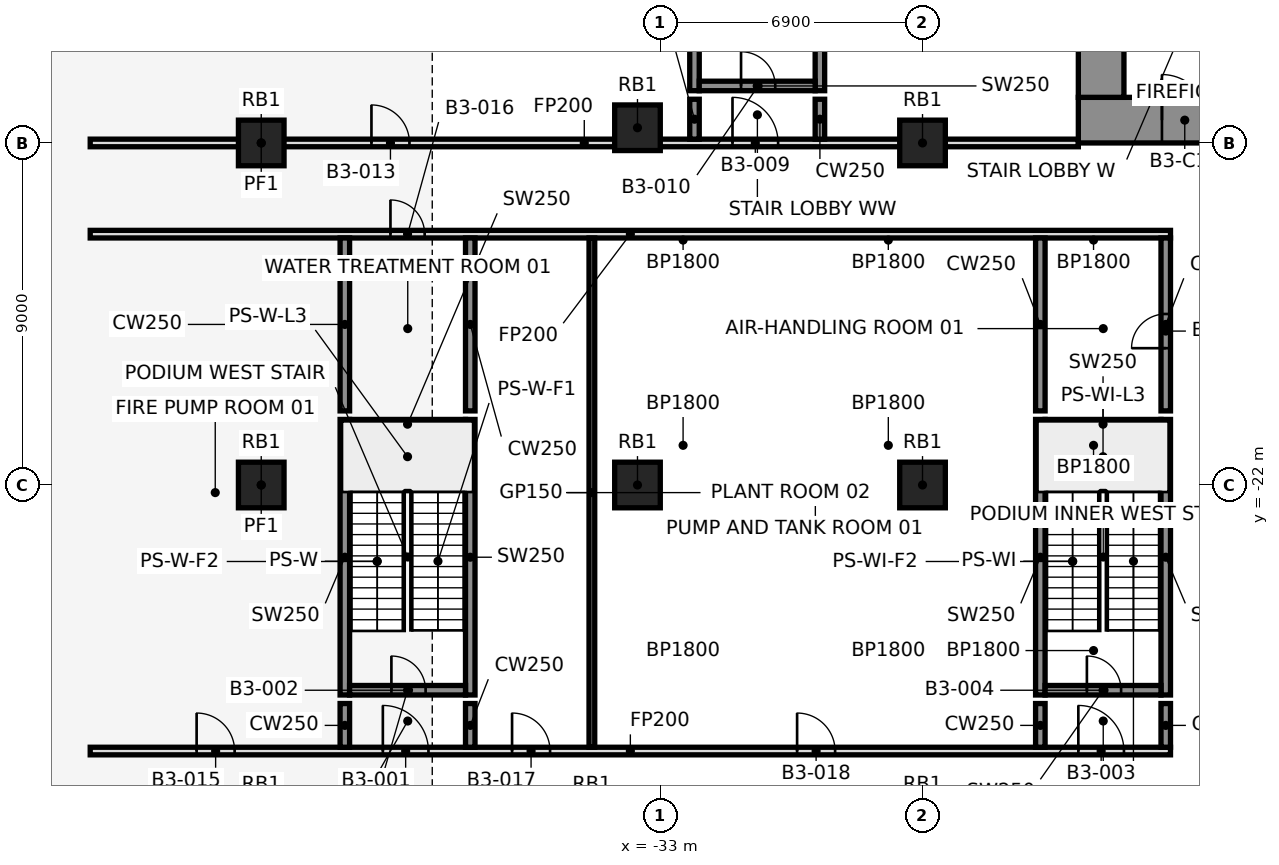
"""IFC4 building model, lengths in metres.
Left out: names, types, materials, properties, quantities, classifications, styles, units other than length and angle.
Written with IfcOpenShell. Run it as: python <this file> out.ifc"""

import sys

from ifc_helpers import new_model, si_unit, direction, frame, frame_2d, origin, origin_2d, place, context, subcontext, project, spatial, rectangle, extrude, element, fill, save


model = new_model("IFC4")
c1 = context("Model", 3, precision=1e-05, world=origin(), true_north=direction((0.0, 1.0)))
c2 = subcontext(c1, "Body", "Model", "MODEL_VIEW")
j1 = project(units=[si_unit("LENGTHUNIT", "METRE"), si_unit("PLANEANGLEUNIT", "RADIAN")], contexts=[c1])
p1 = place(None, origin())
s1 = spatial("IfcSite", under=j1, at=p1, CompositionType="ELEMENT")
p2 = place(p1, origin())
s2 = spatial("IfcBuilding", under=s1, at=p2, CompositionType="ELEMENT")
p3 = place(p2, frame((0.0, 0.0, -15.0)))
s3 = spatial("IfcBuildingStorey", under=s2, at=p3, CompositionType="ELEMENT", Elevation=-15.0)
for number, where, z_axis, x_axis in (
    (1, (-33.6, -12.6, 0.0), (0.0, 0.0, 1.0), (1.0, 0.0, 0.0)),
    (2, (-33.6, -22.0, 0.0), (0.0, 0.0, 1.0), (1.0, 0.0, 0.0)),
    (3, (-26.1, -22.0, 0.0), (0.0, 0.0, 1.0), (1.0, 0.0, 0.0)),
):
    element("IfcColumn", number, at=place(p3, frame(where, z_axis=z_axis, x_axis=x_axis)), inside=s3, PredefinedType="COLUMN", context=c2, shape_type="SweptSolid", body=[
        extrude(rectangle(XDim=1.2, YDim=1.2, at=origin_2d()), origin(), (0.0, 0.0, 1.0), 5.0),
    ])
for number, where, z_axis, x_axis in (
    (4, (-43.5, -13.0, -0.3), (0.0, 0.0, 1.0), (1.0, 0.0, 0.0)),
    (5, (-43.5, -22.0, -0.3), (0.0, 0.0, 1.0), (1.0, 0.0, 0.0)),
):
    element("IfcColumn", number, at=place(p3, frame(where, z_axis=z_axis, x_axis=x_axis)), inside=s3, PredefinedType="COLUMN", context=c2, shape_type="SweptSolid", body=[
        extrude(rectangle(XDim=1.2, YDim=1.2, at=origin_2d()), origin(), (0.0, 0.0, 1.0), 5.3),
    ])
p4 = place(p3, frame((-26.1, -13.0, 0.0), z_axis=(0.0, 0.0, 1.0), x_axis=(1.0, 0.0, 0.0)))
e6 = element("IfcColumn", 6, at=p4, inside=s3, PredefinedType="COLUMN", context=c2, shape_type="SweptSolid", body=[
    extrude(rectangle(XDim=1.2, YDim=1.2, at=origin_2d()), origin(), (0.0, 0.0, 1.0), 5.0),
])
for number, where, z_axis, x_axis in (
    (7, (-32.1, -11.625, 0.0), (0.0, 0.0, 1.0), (0.0, 1.0, 0.0)),
    (8, (-28.8, -11.625, 0.0), (0.0, 0.0, 1.0), (0.0, 1.0, 0.0)),
):
    element("IfcWall", number, at=place(p3, frame(where, z_axis=z_axis, x_axis=x_axis)), inside=s3, PredefinedType="SHEAR", context=c2, shape_type="SweptSolid", body=[
        extrude(rectangle(XDim=7.25, YDim=0.25, at=frame_2d((3.625, 0.0))), origin(), (0.0, 0.0, 1.0), 5.0),
    ])
p5 = place(p3, frame((-31.975, -11.5, 0.0), z_axis=(0.0, 0.0, 1.0), x_axis=(1.0, 0.0, 0.0)))
e9 = element("IfcWall", 9, at=p5, inside=s3, PredefinedType="SHEAR", context=c2, shape_type="SweptSolid", body=[
    extrude(rectangle(XDim=3.05, YDim=0.25, at=frame_2d((1.525, 0.0))), origin(), (0.0, 0.0, 1.0), 5.0),
])
p6 = place(p5, frame((1.1, 0.0, 0.0)))
e10 = element("IfcOpeningElement", 10, at=p6, cuts=e9, PredefinedType="OPENING", context=c2, shape_type="SweptSolid", body=[
    extrude(rectangle(XDim=0.9, YDim=2.1, at=frame_2d((0.45, 1.05))), frame((0.0, 0.137, 0.0), z_axis=(0.0, -1.0, 0.0), x_axis=(1.0, 0.0, 0.0)), (0.0, 0.0, 1.0), 0.274),
])
for number, where, z_axis, x_axis in (
    (11, (-41.3, -27.525, 0.0), (0.0, 0.0, 1.0), (0.0, 1.0, 0.0)),
    (12, (-38.0, -27.525, 0.0), (0.0, 0.0, 1.0), (0.0, 1.0, 0.0)),
):
    element("IfcWall", number, at=place(p3, frame(where, z_axis=z_axis, x_axis=x_axis)), inside=s3, PredefinedType="SHEAR", context=c2, shape_type="SweptSolid", body=[
        extrude(rectangle(XDim=7.25, YDim=0.25, at=frame_2d((3.625, 0.0))), origin(), (0.0, 0.0, 1.0), 5.0),
    ])
p7 = place(p3, frame((-41.175, -27.4, 0.0), z_axis=(0.0, 0.0, 1.0), x_axis=(1.0, 0.0, 0.0)))
e13 = element("IfcWall", 13, at=p7, inside=s3, PredefinedType="SHEAR", context=c2, shape_type="SweptSolid", body=[
    extrude(rectangle(XDim=3.05, YDim=0.25, at=frame_2d((1.525, 0.0))), origin(), (0.0, 0.0, 1.0), 5.0),
])
p8 = place(p7, frame((1.1, 0.0, 0.0)))
e14 = element("IfcOpeningElement", 14, at=p8, cuts=e13, PredefinedType="OPENING", context=c2, shape_type="SweptSolid", body=[
    extrude(rectangle(XDim=0.9, YDim=2.1, at=frame_2d((0.45, 1.05))), frame((0.0, 0.137, 0.0), z_axis=(0.0, -1.0, 0.0), x_axis=(1.0, 0.0, 0.0)), (0.0, 0.0, 1.0), 0.274),
])
p9 = place(p3, frame((-41.175, -20.4, 0.0), z_axis=(0.0, 0.0, 1.0), x_axis=(1.0, 0.0, 0.0)))
e15 = element("IfcWall", 15, at=p9, inside=s3, PredefinedType="SHEAR", context=c2, shape_type="SweptSolid", body=[
    extrude(rectangle(XDim=3.05, YDim=0.25, at=frame_2d((1.525, 0.0))), origin(), (0.0, 0.0, 1.0), 5.0),
])
for number, where, z_axis, x_axis in (
    (16, (-23.0, -27.525, 0.0), (0.0, 0.0, 1.0), (0.0, 1.0, 0.0)),
    (17, (-19.7, -27.525, 0.0), (0.0, 0.0, 1.0), (0.0, 1.0, 0.0)),
):
    element("IfcWall", number, at=place(p3, frame(where, z_axis=z_axis, x_axis=x_axis)), inside=s3, PredefinedType="SHEAR", context=c2, shape_type="SweptSolid", body=[
        extrude(rectangle(XDim=7.25, YDim=0.25, at=frame_2d((3.625, 0.0))), origin(), (0.0, 0.0, 1.0), 5.0),
    ])
p10 = place(p3, frame((-22.875, -27.4, 0.0), z_axis=(0.0, 0.0, 1.0), x_axis=(1.0, 0.0, 0.0)))
e18 = element("IfcWall", 18, at=p10, inside=s3, PredefinedType="SHEAR", context=c2, shape_type="SweptSolid", body=[
    extrude(rectangle(XDim=3.05, YDim=0.25, at=frame_2d((1.525, 0.0))), origin(), (0.0, 0.0, 1.0), 5.0),
])
p11 = place(p10, frame((1.1, 0.0, 0.0)))
e19 = element("IfcOpeningElement", 19, at=p11, cuts=e18, PredefinedType="OPENING", context=c2, shape_type="SweptSolid", body=[
    extrude(rectangle(XDim=0.9, YDim=2.1, at=frame_2d((0.45, 1.05))), frame((0.0, 0.137, 0.0), z_axis=(0.0, -1.0, 0.0), x_axis=(1.0, 0.0, 0.0)), (0.0, 0.0, 1.0), 0.274),
])
p12 = place(p3, frame((-22.875, -20.4, 0.0), z_axis=(0.0, 0.0, 1.0), x_axis=(1.0, 0.0, 0.0)))
e20 = element("IfcWall", 20, at=p12, inside=s3, PredefinedType="SHEAR", context=c2, shape_type="SweptSolid", body=[
    extrude(rectangle(XDim=3.05, YDim=0.25, at=frame_2d((1.525, 0.0))), origin(), (0.0, 0.0, 1.0), 5.0),
])
p13 = place(p3, frame((-48.0, -29.0, 0.0), z_axis=(0.0, 0.0, 1.0), x_axis=(1.0, 0.0, 0.0)))
e21 = element("IfcWall", 21, at=p13, inside=s3, PredefinedType="PARTITIONING", context=c2, shape_type="SweptSolid", body=[
    extrude(rectangle(XDim=28.425, YDim=0.2, at=frame_2d((14.212, 0.0))), origin(), (0.0, 0.0, 1.0), 4.7),
])
p14 = place(p13, frame((7.7, 0.0, 0.0)))
e22 = element("IfcOpeningElement", 22, at=p14, cuts=e21, PredefinedType="OPENING", context=c2, shape_type="SweptSolid", body=[
    extrude(rectangle(XDim=1.2, YDim=2.1, at=frame_2d((0.6, 1.05))), frame((0.0, 0.112, 0.0), z_axis=(0.0, -1.0, 0.0), x_axis=(1.0, 0.0, 0.0)), (0.0, 0.0, 1.0), 0.224),
])
p15 = place(p13, frame((26.0, 0.0, 0.0)))
e23 = element("IfcOpeningElement", 23, at=p15, cuts=e21, PredefinedType="OPENING", context=c2, shape_type="SweptSolid", body=[
    extrude(rectangle(XDim=1.2, YDim=2.1, at=frame_2d((0.6, 1.05))), frame((0.0, 0.112, 0.0), z_axis=(0.0, -1.0, 0.0), x_axis=(1.0, 0.0, 0.0)), (0.0, 0.0, 1.0), 0.224),
])
p16 = place(p13, frame((2.8, 0.0, 0.0)))
e24 = element("IfcOpeningElement", 24, at=p16, cuts=e21, PredefinedType="OPENING", context=c2, shape_type="SweptSolid", body=[
    extrude(rectangle(XDim=1.0, YDim=2.1, at=frame_2d((0.5, 1.05))), frame((0.0, 0.112, 0.0), z_axis=(0.0, -1.0, 0.0), x_axis=(1.0, 0.0, 0.0)), (0.0, 0.0, 1.0), 0.224),
])
p17 = place(p13, frame((11.1, 0.0, 0.0)))
e25 = element("IfcOpeningElement", 25, at=p17, cuts=e21, PredefinedType="OPENING", context=c2, shape_type="SweptSolid", body=[
    extrude(rectangle(XDim=1.0, YDim=2.1, at=frame_2d((0.5, 1.05))), frame((0.0, 0.112, 0.0), z_axis=(0.0, -1.0, 0.0), x_axis=(1.0, 0.0, 0.0)), (0.0, 0.0, 1.0), 0.224),
])
p18 = place(p13, frame((18.6, 0.0, 0.0)))
e26 = element("IfcOpeningElement", 26, at=p18, cuts=e21, PredefinedType="OPENING", context=c2, shape_type="SweptSolid", body=[
    extrude(rectangle(XDim=1.0, YDim=2.1, at=frame_2d((0.5, 1.05))), frame((0.0, 0.112, 0.0), z_axis=(0.0, -1.0, 0.0), x_axis=(1.0, 0.0, 0.0)), (0.0, 0.0, 1.0), 0.224),
])
p19 = place(p3, frame((-48.0, -15.4, 0.0), z_axis=(0.0, 0.0, 1.0), x_axis=(1.0, 0.0, 0.0)))
e27 = element("IfcWall", 27, at=p19, inside=s3, PredefinedType="PARTITIONING", context=c2, shape_type="SweptSolid", body=[
    extrude(rectangle(XDim=28.425, YDim=0.2, at=frame_2d((14.212, 0.0))), origin(), (0.0, 0.0, 1.0), 4.7),
])
p20 = place(p19, frame((7.9, 0.0, 0.0)))
e28 = element("IfcOpeningElement", 28, at=p20, cuts=e27, PredefinedType="OPENING", context=c2, shape_type="SweptSolid", body=[
    extrude(rectangle(XDim=0.9, YDim=2.1, at=frame_2d((0.45, 1.05))), frame((0.0, 0.112, 0.0), z_axis=(0.0, -1.0, 0.0), x_axis=(1.0, 0.0, 0.0)), (0.0, 0.0, 1.0), 0.224),
])
p21 = place(p3, frame((-48.0, -13.0, 0.0), z_axis=(0.0, 0.0, 1.0), x_axis=(1.0, 0.0, 0.0)))
e29 = element("IfcWall", 29, at=p21, inside=s3, PredefinedType="PARTITIONING", context=c2, shape_type="SweptSolid", body=[
    extrude(rectangle(XDim=26.0, YDim=0.2, at=frame_2d((13.0, 0.0))), origin(), (0.0, 0.0, 1.0), 4.7),
])
p22 = place(p21, frame((16.9, 0.0, 0.0)))
e30 = element("IfcOpeningElement", 30, at=p22, cuts=e29, PredefinedType="OPENING", context=c2, shape_type="SweptSolid", body=[
    extrude(rectangle(XDim=1.2, YDim=2.1, at=frame_2d((0.6, 1.05))), frame((0.0, 0.112, 0.0), z_axis=(0.0, -1.0, 0.0), x_axis=(1.0, 0.0, 0.0)), (0.0, 0.0, 1.0), 0.224),
])
p23 = place(p21, frame((7.4, 0.0, 0.0)))
e31 = element("IfcOpeningElement", 31, at=p23, cuts=e29, PredefinedType="OPENING", context=c2, shape_type="SweptSolid", body=[
    extrude(rectangle(XDim=1.0, YDim=2.1, at=frame_2d((0.5, 1.05))), frame((0.0, 0.112, 0.0), z_axis=(0.0, -1.0, 0.0), x_axis=(1.0, 0.0, 0.0)), (0.0, 0.0, 1.0), 0.224),
])
p24 = place(p3, frame((-41.3, -28.9, 0.0), z_axis=(0.0, 0.0, 1.0), x_axis=(0.0, 1.0, 0.0)))
e32 = element("IfcWall", 32, at=p24, inside=s3, PredefinedType="SHEAR", context=c2, shape_type="SweptSolid", body=[
    extrude(rectangle(XDim=1.15, YDim=0.25, at=frame_2d((0.575, 0.0))), origin(), (0.0, 0.0, 1.0), 5.0),
])
p25 = place(p3, frame((-41.3, -20.05, 0.0), z_axis=(0.0, 0.0, 1.0), x_axis=(0.0, 1.0, 0.0)))
e33 = element("IfcWall", 33, at=p25, inside=s3, PredefinedType="SHEAR", context=c2, shape_type="SweptSolid", body=[
    extrude(rectangle(XDim=4.55, YDim=0.25, at=frame_2d((2.275, 0.0))), origin(), (0.0, 0.0, 1.0), 5.0),
])
p26 = place(p3, frame((-38.0, -28.9, 0.0), z_axis=(0.0, 0.0, 1.0), x_axis=(0.0, 1.0, 0.0)))
e34 = element("IfcWall", 34, at=p26, inside=s3, PredefinedType="SHEAR", context=c2, shape_type="SweptSolid", body=[
    extrude(rectangle(XDim=1.15, YDim=0.25, at=frame_2d((0.575, 0.0))), origin(), (0.0, 0.0, 1.0), 5.0),
])
p27 = place(p3, frame((-38.0, -20.05, 0.0), z_axis=(0.0, 0.0, 1.0), x_axis=(0.0, 1.0, 0.0)))
e35 = element("IfcWall", 35, at=p27, inside=s3, PredefinedType="SHEAR", context=c2, shape_type="SweptSolid", body=[
    extrude(rectangle(XDim=4.55, YDim=0.25, at=frame_2d((2.275, 0.0))), origin(), (0.0, 0.0, 1.0), 5.0),
])
p28 = place(p3, frame((-34.8, -28.9, 0.0), z_axis=(0.0, 0.0, 1.0), x_axis=(0.0, 1.0, 0.0)))
e36 = element("IfcWall", 36, at=p28, inside=s3, PredefinedType="PARTITIONING", context=c2, shape_type="SweptSolid", body=[
    extrude(rectangle(XDim=13.4, YDim=0.15, at=frame_2d((6.7, 0.0))), origin(), (0.0, 0.0, 1.0), 4.7),
])
for number, where, z_axis, x_axis in (
    (37, (-32.1, -12.9, 0.0), (0.0, 0.0, 1.0), (0.0, 1.0, 0.0)),
    (38, (-28.8, -12.9, 0.0), (0.0, 0.0, 1.0), (0.0, 1.0, 0.0)),
):
    element("IfcWall", number, at=place(p3, frame(where, z_axis=z_axis, x_axis=x_axis)), inside=s3, PredefinedType="SHEAR", context=c2, shape_type="SweptSolid", body=[
        extrude(rectangle(XDim=1.05, YDim=0.25, at=frame_2d((0.525, 0.0))), origin(), (0.0, 0.0, 1.0), 5.0),
    ])
p29 = place(p3, frame((-23.0, -28.9, 0.0), z_axis=(0.0, 0.0, 1.0), x_axis=(0.0, 1.0, 0.0)))
e39 = element("IfcWall", 39, at=p29, inside=s3, PredefinedType="SHEAR", context=c2, shape_type="SweptSolid", body=[
    extrude(rectangle(XDim=1.15, YDim=0.25, at=frame_2d((0.575, 0.0))), origin(), (0.0, 0.0, 1.0), 5.0),
])
p30 = place(p3, frame((-23.0, -20.05, 0.0), z_axis=(0.0, 0.0, 1.0), x_axis=(0.0, 1.0, 0.0)))
e40 = element("IfcWall", 40, at=p30, inside=s3, PredefinedType="SHEAR", context=c2, shape_type="SweptSolid", body=[
    extrude(rectangle(XDim=4.55, YDim=0.25, at=frame_2d((2.275, 0.0))), origin(), (0.0, 0.0, 1.0), 5.0),
])
p31 = place(p3, frame((-19.7, -28.9, 0.0), z_axis=(0.0, 0.0, 1.0), x_axis=(0.0, 1.0, 0.0)))
e41 = element("IfcWall", 41, at=p31, inside=s3, PredefinedType="SHEAR", context=c2, shape_type="SweptSolid", body=[
    extrude(rectangle(XDim=1.15, YDim=0.25, at=frame_2d((0.575, 0.0))), origin(), (0.0, 0.0, 1.0), 5.0),
])
p32 = place(p3, frame((-19.7, -20.05, 0.0), z_axis=(0.0, 0.0, 1.0), x_axis=(0.0, 1.0, 0.0)))
e42 = element("IfcWall", 42, at=p32, inside=s3, PredefinedType="SHEAR", context=c2, shape_type="SweptSolid", body=[
    extrude(rectangle(XDim=4.55, YDim=0.25, at=frame_2d((2.275, 0.0))), origin(), (0.0, 0.0, 1.0), 5.0),
])
p33 = place(p32, frame((1.65, 0.0, 0.0)))
e43 = element("IfcOpeningElement", 43, at=p33, cuts=e42, PredefinedType="OPENING", context=c2, shape_type="SweptSolid", body=[
    extrude(rectangle(XDim=0.9, YDim=2.1, at=frame_2d((0.45, 1.05))), frame((0.0, 0.137, 0.0), z_axis=(0.0, -1.0, 0.0), x_axis=(1.0, 0.0, 0.0)), (0.0, 0.0, 1.0), 0.274),
])
p34 = place(p3, frame((-22.0, -12.4, 0.0), z_axis=(0.0, 0.0, 1.0), x_axis=(1.0, 0.0, 0.0)))
e44 = element("IfcWall", 44, at=p34, inside=s3, PredefinedType="SHEAR", context=c2, shape_type="SweptSolid", body=[
    extrude(rectangle(XDim=44.0, YDim=1.2, at=frame_2d((22.0, 0.0))), origin(), (0.0, 0.0, 1.0), 5.0),
])
p35 = place(p34, frame((2.2, 0.0, 0.0)))
e45 = element("IfcOpeningElement", 45, at=p35, cuts=e44, PredefinedType="OPENING", context=c2, shape_type="SweptSolid", body=[
    extrude(rectangle(XDim=1.2, YDim=2.1, at=frame_2d((0.6, 1.05))), frame((0.0, 0.612, 0.0), z_axis=(0.0, -1.0, 0.0), x_axis=(1.0, 0.0, 0.0)), (0.0, 0.0, 1.0), 1.224),
])
p36 = place(p34, frame((21.4, 0.0, 0.0)))
e46 = element("IfcOpeningElement", 46, at=p36, cuts=e44, PredefinedType="OPENING", context=c2, shape_type="SweptSolid", body=[
    extrude(rectangle(XDim=1.2, YDim=2.1, at=frame_2d((0.6, 1.05))), frame((0.0, 0.612, 0.0), z_axis=(0.0, -1.0, 0.0), x_axis=(1.0, 0.0, 0.0)), (0.0, 0.0, 1.0), 1.224),
])
p37 = place(p34, frame((40.6, 0.0, 0.0)))
e47 = element("IfcOpeningElement", 47, at=p37, cuts=e44, PredefinedType="OPENING", context=c2, shape_type="SweptSolid", body=[
    extrude(rectangle(XDim=1.2, YDim=2.1, at=frame_2d((0.6, 1.05))), frame((0.0, 0.612, 0.0), z_axis=(0.0, -1.0, 0.0), x_axis=(1.0, 0.0, 0.0)), (0.0, 0.0, 1.0), 1.224),
])
p38 = place(p34, frame((16.0, 0.0, 0.0)))
e48 = element("IfcOpeningElement", 48, at=p38, cuts=e44, PredefinedType="OPENING", context=c2, shape_type="SweptSolid", body=[
    extrude(rectangle(XDim=1.8, YDim=2.1, at=frame_2d((0.9, 1.05))), frame((0.0, 0.612, 0.0), z_axis=(0.0, -1.0, 0.0), x_axis=(1.0, 0.0, 0.0)), (0.0, 0.0, 1.0), 1.224),
])
p39 = place(p34, frame((6.3, 0.0, 0.0)))
e49 = element("IfcOpeningElement", 49, at=p39, cuts=e44, PredefinedType="OPENING", context=c2, shape_type="SweptSolid", body=[
    extrude(rectangle(XDim=1.2, YDim=2.1, at=frame_2d((0.6, 1.05))), frame((0.0, 0.612, 0.0), z_axis=(0.0, -1.0, 0.0), x_axis=(1.0, 0.0, 0.0)), (0.0, 0.0, 1.0), 1.224),
])
p40 = place(p34, frame((26.2, 0.0, 0.0)))
e50 = element("IfcOpeningElement", 50, at=p40, cuts=e44, PredefinedType="OPENING", context=c2, shape_type="SweptSolid", body=[
    extrude(rectangle(XDim=1.8, YDim=2.1, at=frame_2d((0.9, 1.05))), frame((0.0, 0.612, 0.0), z_axis=(0.0, -1.0, 0.0), x_axis=(1.0, 0.0, 0.0)), (0.0, 0.0, 1.0), 1.224),
])
p41 = place(p34, frame((36.5, 0.0, 0.0)))
e51 = element("IfcOpeningElement", 51, at=p41, cuts=e44, PredefinedType="OPENING", context=c2, shape_type="SweptSolid", body=[
    extrude(rectangle(XDim=1.2, YDim=2.1, at=frame_2d((0.6, 1.05))), frame((0.0, 0.612, 0.0), z_axis=(0.0, -1.0, 0.0), x_axis=(1.0, 0.0, 0.0)), (0.0, 0.0, 1.0), 1.224),
])
p42 = place(p3, frame((-21.4, -11.8, 0.0), z_axis=(0.0, 0.0, 1.0), x_axis=(0.0, 1.0, 0.0)))
e52 = element("IfcWall", 52, at=p42, inside=s3, PredefinedType="SHEAR", context=c2, shape_type="SweptSolid", body=[
    extrude(rectangle(XDim=10.6, YDim=1.2, at=frame_2d((5.3, 0.0))), origin(), (0.0, 0.0, 1.0), 5.0),
])
p43 = place(p14, origin())
e53 = element("IfcDoor", 53, at=p43, inside=s3, OperationType="SINGLE_SWING_LEFT", PredefinedType="DOOR", context=c2, shape_type="SweptSolid", body=[
    extrude(rectangle(XDim=1.2, YDim=2.1, at=frame_2d((0.6, 1.05))), frame((0.0, 0.025, 0.0), z_axis=(0.0, -1.0, 0.0), x_axis=(1.0, 0.0, 0.0)), (0.0, 0.0, 1.0), 0.05),
])
fill(e22, e53)
p44 = place(p8, origin())
e54 = element("IfcDoor", 54, at=p44, inside=s3, OperationType="SINGLE_SWING_LEFT", PredefinedType="DOOR", context=c2, shape_type="SweptSolid", body=[
    extrude(rectangle(XDim=0.9, YDim=2.1, at=frame_2d((0.45, 1.05))), frame((0.0, 0.025, 0.0), z_axis=(0.0, -1.0, 0.0), x_axis=(1.0, 0.0, 0.0)), (0.0, 0.0, 1.0), 0.05),
])
fill(e14, e54)
p45 = place(p15, origin())
e55 = element("IfcDoor", 55, at=p45, inside=s3, OperationType="SINGLE_SWING_RIGHT", PredefinedType="DOOR", context=c2, shape_type="SweptSolid", body=[
    extrude(rectangle(XDim=1.2, YDim=2.1, at=frame_2d((0.6, 1.05))), frame((0.0, 0.025, 0.0), z_axis=(0.0, -1.0, 0.0), x_axis=(1.0, 0.0, 0.0)), (0.0, 0.0, 1.0), 0.05),
])
fill(e23, e55)
p46 = place(p11, origin())
e56 = element("IfcDoor", 56, at=p46, inside=s3, OperationType="SINGLE_SWING_LEFT", PredefinedType="DOOR", context=c2, shape_type="SweptSolid", body=[
    extrude(rectangle(XDim=0.9, YDim=2.1, at=frame_2d((0.45, 1.05))), frame((0.0, 0.025, 0.0), z_axis=(0.0, -1.0, 0.0), x_axis=(1.0, 0.0, 0.0)), (0.0, 0.0, 1.0), 0.05),
])
fill(e19, e56)
p47 = place(p22, origin())
e57 = element("IfcDoor", 57, at=p47, inside=s3, OperationType="SINGLE_SWING_RIGHT", PredefinedType="DOOR", context=c2, shape_type="SweptSolid", body=[
    extrude(rectangle(XDim=1.2, YDim=2.1, at=frame_2d((0.6, 1.05))), frame((0.0, 0.025, 0.0), z_axis=(0.0, -1.0, 0.0), x_axis=(1.0, 0.0, 0.0)), (0.0, 0.0, 1.0), 0.05),
])
fill(e30, e57)
p48 = place(p6, origin())
e58 = element("IfcDoor", 58, at=p48, inside=s3, OperationType="SINGLE_SWING_LEFT", PredefinedType="DOOR", context=c2, shape_type="SweptSolid", body=[
    extrude(rectangle(XDim=0.9, YDim=2.1, at=frame_2d((0.45, 1.05))), frame((0.0, 0.025, 0.0), z_axis=(0.0, -1.0, 0.0), x_axis=(1.0, 0.0, 0.0)), (0.0, 0.0, 1.0), 0.05),
])
fill(e10, e58)
p49 = place(p23, origin())
e59 = element("IfcDoor", 59, at=p49, inside=s3, OperationType="SINGLE_SWING_LEFT", PredefinedType="DOOR", context=c2, shape_type="SweptSolid", body=[
    extrude(rectangle(XDim=1.0, YDim=2.1, at=frame_2d((0.5, 1.05))), frame((0.0, 0.025, 0.0), z_axis=(0.0, -1.0, 0.0), x_axis=(1.0, 0.0, 0.0)), (0.0, 0.0, 1.0), 0.05),
])
fill(e31, e59)
p50 = place(p16, origin())
e60 = element("IfcDoor", 60, at=p50, inside=s3, OperationType="SINGLE_SWING_RIGHT", PredefinedType="DOOR", context=c2, shape_type="SweptSolid", body=[
    extrude(rectangle(XDim=1.0, YDim=2.1, at=frame_2d((0.5, 1.05))), frame((0.0, 0.025, 0.0), z_axis=(0.0, -1.0, 0.0), x_axis=(1.0, 0.0, 0.0)), (0.0, 0.0, 1.0), 0.05),
])
fill(e24, e60)
p51 = place(p20, frame((0.9, 0.0, 0.0), z_axis=(0.0, 0.0, 1.0), x_axis=(-1.0, 0.0, 0.0)))
e61 = element("IfcDoor", 61, at=p51, inside=s3, OperationType="SINGLE_SWING_LEFT", PredefinedType="DOOR", context=c2, shape_type="SweptSolid", body=[
    extrude(rectangle(XDim=0.9, YDim=2.1, at=frame_2d((0.45, 1.05))), frame((0.0, 0.025, 0.0), z_axis=(0.0, -1.0, 0.0), x_axis=(1.0, 0.0, 0.0)), (0.0, 0.0, 1.0), 0.05),
])
fill(e28, e61)
p52 = place(p17, origin())
e62 = element("IfcDoor", 62, at=p52, inside=s3, OperationType="SINGLE_SWING_LEFT", PredefinedType="DOOR", context=c2, shape_type="SweptSolid", body=[
    extrude(rectangle(XDim=1.0, YDim=2.1, at=frame_2d((0.5, 1.05))), frame((0.0, 0.025, 0.0), z_axis=(0.0, -1.0, 0.0), x_axis=(1.0, 0.0, 0.0)), (0.0, 0.0, 1.0), 0.05),
])
fill(e25, e62)
p53 = place(p18, origin())
e63 = element("IfcDoor", 63, at=p53, inside=s3, OperationType="SINGLE_SWING_RIGHT", PredefinedType="DOOR", context=c2, shape_type="SweptSolid", body=[
    extrude(rectangle(XDim=1.0, YDim=2.1, at=frame_2d((0.5, 1.05))), frame((0.0, 0.025, 0.0), z_axis=(0.0, -1.0, 0.0), x_axis=(1.0, 0.0, 0.0)), (0.0, 0.0, 1.0), 0.05),
])
fill(e26, e63)
p54 = place(p33, origin())
e64 = element("IfcDoor", 64, at=p54, inside=s3, OperationType="SINGLE_SWING_LEFT", PredefinedType="DOOR", context=c2, shape_type="SweptSolid", body=[
    extrude(rectangle(XDim=0.9, YDim=2.1, at=frame_2d((0.45, 1.05))), frame((0.0, 0.025, 0.0), z_axis=(0.0, -1.0, 0.0), x_axis=(1.0, 0.0, 0.0)), (0.0, 0.0, 1.0), 0.05),
])
fill(e43, e64)
p55 = place(p35, frame((1.2, 0.0, 0.0), z_axis=(0.0, 0.0, 1.0), x_axis=(-1.0, 0.0, 0.0)))
e65 = element("IfcDoor", 65, at=p55, inside=s3, OperationType="SINGLE_SWING_RIGHT", PredefinedType="DOOR", context=c2, shape_type="SweptSolid", body=[
    extrude(rectangle(XDim=1.2, YDim=2.1, at=frame_2d((0.6, 1.05))), frame((0.0, 0.025, 0.0), z_axis=(0.0, -1.0, 0.0), x_axis=(1.0, 0.0, 0.0)), (0.0, 0.0, 1.0), 0.05),
])
fill(e45, e65)
save(model, sys.argv[1])
